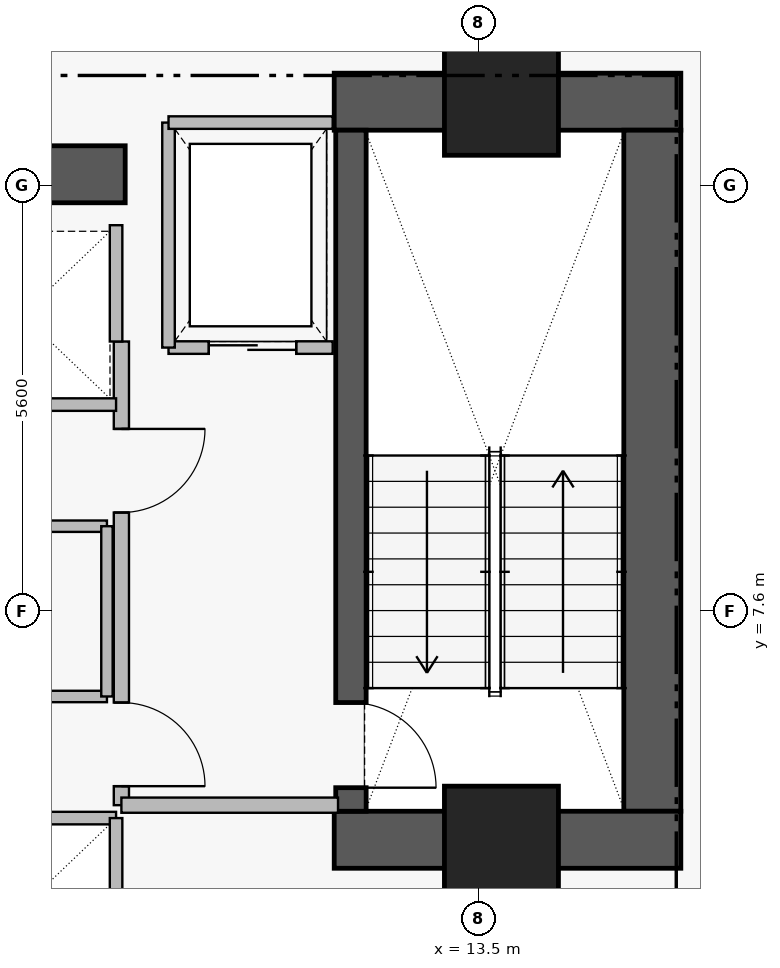
"""IFC4 building model, lengths in metres.
Left out: names, types, materials, properties, quantities, classifications, styles, units other than length and angle.
Written with IfcOpenShell. Run it as: python <this file> out.ifc"""

import sys

from ifc_helpers import new_model, si_unit, direction, frame, frame_2d, origin, origin_2d, place, context, subcontext, project, spatial, rectangle, extrude, element, fill, save


model = new_model("IFC4")
c1 = context("Model", 3, precision=1e-05, world=origin(), true_north=direction((0.0, 1.0)))
c2 = subcontext(c1, "Body", "Model", "MODEL_VIEW")
j1 = project(units=[si_unit("LENGTHUNIT", "METRE"), si_unit("PLANEANGLEUNIT", "RADIAN")], contexts=[c1])
p1 = place(None, origin())
s1 = spatial("IfcSite", under=j1, at=p1, CompositionType="ELEMENT")
p2 = place(p1, origin())
s2 = spatial("IfcBuilding", under=s1, at=p2, CompositionType="ELEMENT")
p3 = place(p2, frame((0.0, 0.0, 106.6)))
s3 = spatial("IfcBuildingStorey", under=s2, at=p3, CompositionType="ELEMENT", Elevation=106.6)
p4 = place(p3, frame((11.6, 14.305, 0.0), z_axis=(0.0, 0.0, 1.0), x_axis=(1.0, 0.0, 0.0)))
e1 = element("IfcWall", 1, at=p4, inside=s3, PredefinedType="SHEAR", context=c2, shape_type="SweptSolid", body=[
    extrude(rectangle(XDim=4.56, YDim=0.75, at=frame_2d((2.28, 0.0))), origin(), (0.0, 0.0, 1.0), 3.46),
])
p5 = place(p3, frame((15.785, 4.97, 0.0), z_axis=(0.0, 0.0, 1.0), x_axis=(0.0, 1.0, 0.0)))
e2 = element("IfcWall", 2, at=p5, inside=s3, PredefinedType="SHEAR", context=c2, shape_type="SweptSolid", body=[
    extrude(rectangle(XDim=8.96, YDim=0.75, at=frame_2d((4.48, 0.0))), origin(), (0.0, 0.0, 1.0), 3.46),
])
p6 = place(p3, frame((11.6, 4.595, 0.0), z_axis=(0.0, 0.0, 1.0), x_axis=(1.0, 0.0, 0.0)))
e3 = element("IfcWall", 3, at=p6, inside=s3, PredefinedType="SHEAR", context=c2, shape_type="SweptSolid", body=[
    extrude(rectangle(XDim=4.56, YDim=0.75, at=frame_2d((2.28, 0.0))), origin(), (0.0, 0.0, 1.0), 3.46),
])
p7 = place(p3, frame((1.25, 13.35, 0.0), z_axis=(0.0, 0.0, 1.0), x_axis=(1.0, 0.0, 0.0)))
e4 = element("IfcWall", 4, at=p7, inside=s3, PredefinedType="SHEAR", context=c2, shape_type="SweptSolid", body=[
    extrude(rectangle(XDim=7.6, YDim=0.75, at=frame_2d((3.8, 0.0))), origin(), (0.0, 0.0, 1.0), 3.43),
])
p8 = place(p3, frame((11.82, 13.93, 0.0), z_axis=(0.0, 0.0, 1.0), x_axis=(0.0, -1.0, 0.0)))
e5 = element("IfcWall", 5, at=p8, inside=s3, PredefinedType="SHEAR", context=c2, shape_type="SweptSolid", body=[
    extrude(rectangle(XDim=8.96, YDim=0.4, at=frame_2d((4.48, 0.0))), origin(), (0.0, 0.0, 1.0), 3.46),
])
p9 = place(p8, frame((7.53, 0.0, 0.0)))
e6 = element("IfcOpeningElement", 6, at=p9, cuts=e5, PredefinedType="OPENING", context=c2, shape_type="SweptSolid", body=[
    extrude(rectangle(XDim=1.12, YDim=2.22, at=frame_2d((0.56, 1.11))), frame((0.0, 0.21, 0.0), z_axis=(0.0, -1.0, 0.0), x_axis=(1.0, 0.0, 0.0)), (0.0, 0.0, 1.0), 0.42),
])
for number, where, z_axis, x_axis in (
    (7, (13.8, 14.35, 0.0), (0.0, 0.0, 1.0), (1.0, 0.0, 0.0)),
    (8, (13.8, 4.55, 0.0), (0.0, 0.0, 1.0), (1.0, 0.0, 0.0)),
):
    element("IfcColumn", number, at=place(p3, frame(where, z_axis=z_axis, x_axis=x_axis)), inside=s3, PredefinedType="COLUMN", context=c2, shape_type="SweptSolid", body=[
        extrude(rectangle(XDim=1.5, YDim=1.5, at=origin_2d()), origin(), (0.0, 0.0, 1.0), 3.65),
    ])
p10 = place(p3, frame((8.8, 11.15, 0.0), z_axis=(0.0, 0.0, 1.0), x_axis=(0.0, -1.0, 0.0)))
e9 = element("IfcWall", 9, at=p10, inside=s3, PredefinedType="PARTITIONING", context=c2, shape_type="SweptSolid", body=[
    extrude(rectangle(XDim=6.1, YDim=0.2, at=frame_2d((3.05, 0.0))), origin(), (0.0, 0.0, 1.0), 3.43),
])
p11 = place(p10, frame((1.15, 0.0, 0.0)))
e10 = element("IfcOpeningElement", 10, at=p11, cuts=e9, PredefinedType="OPENING", context=c2, shape_type="SweptSolid", body=[
    extrude(rectangle(XDim=1.1, YDim=2.2, at=frame_2d((0.55, 1.1))), frame((0.0, 0.11, 0.0), z_axis=(0.0, -1.0, 0.0), x_axis=(1.0, 0.0, 0.0)), (0.0, 0.0, 1.0), 0.22),
])
p12 = place(p10, frame((4.75, 0.0, 0.0)))
e11 = element("IfcOpeningElement", 11, at=p12, cuts=e9, PredefinedType="OPENING", context=c2, shape_type="SweptSolid", body=[
    extrude(rectangle(XDim=1.1, YDim=2.2, at=frame_2d((0.55, 1.1))), frame((0.0, 0.11, 0.0), z_axis=(0.0, -1.0, 0.0), x_axis=(1.0, 0.0, 0.0)), (0.0, 0.0, 1.0), 0.22),
])
p13 = place(p3, frame((9.42, 11.07, 0.0), z_axis=(0.0, 0.0, 1.0), x_axis=(1.0, 0.0, 0.0)))
e12 = element("IfcWall", 12, at=p13, inside=s3, PredefinedType="PARTITIONING", context=c2, shape_type="SweptSolid", body=[
    extrude(rectangle(XDim=2.16, YDim=0.165, at=frame_2d((1.08, 0.0))), origin(), (0.0, 0.0, 1.0), 3.43),
])
p14 = place(p13, frame((0.53, 0.0, 0.0)))
e13 = element("IfcOpeningElement", 13, at=p14, cuts=e12, PredefinedType="OPENING", context=c2, shape_type="SweptSolid", body=[
    extrude(rectangle(XDim=1.15, YDim=2.25, at=frame_2d((0.575, 1.125))), frame((0.0, 0.093, 0.0), z_axis=(0.0, -1.0, 0.0), x_axis=(1.0, 0.0, 0.0)), (0.0, 0.0, 1.0), 0.185),
])
p15 = place(p3, frame((4.37, 6.48, 0.0), z_axis=(0.0, 0.0, 1.0), x_axis=(1.0, 0.0, 0.0)))
e14 = element("IfcWall", 14, at=p15, inside=s3, PredefinedType="PARTITIONING", context=c2, shape_type="SweptSolid", body=[
    extrude(rectangle(XDim=4.24, YDim=0.15, at=frame_2d((2.12, 0.0))), origin(), (0.0, 0.0, 1.0), 3.43),
])
p16 = place(p15, frame((1.67, 0.0, 0.0)))
e15 = element("IfcOpeningElement", 15, at=p16, cuts=e14, PredefinedType="OPENING", context=c2, shape_type="SweptSolid", body=[
    extrude(rectangle(XDim=0.9, YDim=2.15, at=frame_2d((0.45, 1.075))), frame((0.0, 0.085, 0.0), z_axis=(0.0, -1.0, 0.0), x_axis=(1.0, 0.0, 0.0)), (0.0, 0.0, 1.0), 0.17),
])
p17 = place(p3, frame((8.8, 5.05, 0.0), z_axis=(0.0, 0.0, 1.0), x_axis=(1.0, 0.0, 0.0)))
e16 = element("IfcWall", 16, at=p17, inside=s3, PredefinedType="PARTITIONING", context=c2, shape_type="SweptSolid", body=[
    extrude(rectangle(XDim=2.85, YDim=0.2, at=frame_2d((1.425, 0.0))), origin(), (0.0, 0.0, 1.0), 3.43),
])
p18 = place(p3, frame((9.42, 11.07, 0.0), z_axis=(0.0, 0.0, 1.0), x_axis=(0.0, 1.0, 0.0)))
e17 = element("IfcWall", 17, at=p18, inside=s3, PredefinedType="PARTITIONING", context=c2, shape_type="SweptSolid", body=[
    extrude(rectangle(XDim=2.96, YDim=0.165, at=frame_2d((1.48, 0.0))), origin(), (0.0, 0.0, 1.0), 3.43),
])
p19 = place(p3, frame((9.42, 14.03, 0.0), z_axis=(0.0, 0.0, 1.0), x_axis=(1.0, 0.0, 0.0)))
e18 = element("IfcWall", 18, at=p19, inside=s3, PredefinedType="PARTITIONING", context=c2, shape_type="SweptSolid", body=[
    extrude(rectangle(XDim=2.16, YDim=0.165, at=frame_2d((1.08, 0.0))), origin(), (0.0, 0.0, 1.0), 3.43),
])
p20 = place(p3, frame((6.25, 4.88, 0.0), z_axis=(0.0, 0.0, 1.0), x_axis=(1.0, 0.0, 0.0)))
e19 = element("IfcWall", 19, at=p20, inside=s3, PredefinedType="PARTITIONING", context=c2, shape_type="SweptSolid", body=[
    extrude(rectangle(XDim=2.48, YDim=0.165, at=frame_2d((1.24, 0.0))), origin(), (0.0, 0.0, 1.0), 3.43),
])
p21 = place(p3, frame((8.73, 2.52, 0.0), z_axis=(0.0, 0.0, 1.0), x_axis=(0.0, 1.0, 0.0)))
e20 = element("IfcWall", 20, at=p21, inside=s3, PredefinedType="PARTITIONING", context=c2, shape_type="SweptSolid", body=[
    extrude(rectangle(XDim=2.36, YDim=0.165, at=frame_2d((1.18, 0.0))), origin(), (0.0, 0.0, 1.0), 3.43),
])
p22 = place(p3, frame((6.25, 10.32, 0.0), z_axis=(0.0, 0.0, 1.0), x_axis=(1.0, 0.0, 0.0)))
e21 = element("IfcWall", 21, at=p22, inside=s3, PredefinedType="PARTITIONING", context=c2, shape_type="SweptSolid", body=[
    extrude(rectangle(XDim=2.48, YDim=0.165, at=frame_2d((1.24, 0.0))), origin(), (0.0, 0.0, 1.0), 3.43),
])
p23 = place(p3, frame((8.73, 11.15, 0.0), z_axis=(0.0, 0.0, 1.0), x_axis=(0.0, 1.0, 0.0)))
e22 = element("IfcWall", 22, at=p23, inside=s3, PredefinedType="PARTITIONING", context=c2, shape_type="SweptSolid", body=[
    extrude(rectangle(XDim=1.53, YDim=0.165, at=frame_2d((0.765, 0.0))), origin(), (0.0, 0.0, 1.0), 3.43),
])
p24 = place(p3, frame((4.37, 8.72, 0.0), z_axis=(0.0, 0.0, 1.0), x_axis=(1.0, 0.0, 0.0)))
e23 = element("IfcWall", 23, at=p24, inside=s3, PredefinedType="PARTITIONING", context=c2, shape_type="SweptSolid", body=[
    extrude(rectangle(XDim=4.24, YDim=0.15, at=frame_2d((2.12, 0.0))), origin(), (0.0, 0.0, 1.0), 3.43),
])
p25 = place(p3, frame((8.61, 6.48, 0.0), z_axis=(0.0, 0.0, 1.0), x_axis=(0.0, 1.0, 0.0)))
e24 = element("IfcWall", 24, at=p25, inside=s3, PredefinedType="PARTITIONING", context=c2, shape_type="SweptSolid", body=[
    extrude(rectangle(XDim=2.24, YDim=0.15, at=frame_2d((1.12, 0.0))), origin(), (0.0, 0.0, 1.0), 3.43),
])
p26 = place(p9, origin())
e25 = element("IfcDoor", 25, at=p26, inside=s3, OperationType="SINGLE_SWING_RIGHT", PredefinedType="DOOR", context=c2, shape_type="SweptSolid", body=[
    extrude(rectangle(XDim=1.12, YDim=2.22, at=frame_2d((0.56, 1.11))), frame((0.0, 0.025, 0.0), z_axis=(0.0, -1.0, 0.0), x_axis=(1.0, 0.0, 0.0)), (0.0, 0.0, 1.0), 0.05),
])
fill(e6, e25)
p27 = place(p11, origin())
e26 = element("IfcDoor", 26, at=p27, inside=s3, OperationType="SINGLE_SWING_LEFT", PredefinedType="DOOR", context=c2, shape_type="SweptSolid", body=[
    extrude(rectangle(XDim=1.1, YDim=2.2, at=frame_2d((0.55, 1.1))), frame((0.0, 0.025, 0.0), z_axis=(0.0, -1.0, 0.0), x_axis=(1.0, 0.0, 0.0)), (0.0, 0.0, 1.0), 0.05),
])
fill(e10, e26)
p28 = place(p12, origin())
e27 = element("IfcDoor", 27, at=p28, inside=s3, OperationType="SINGLE_SWING_RIGHT", PredefinedType="DOOR", context=c2, shape_type="SweptSolid", body=[
    extrude(rectangle(XDim=1.1, YDim=2.2, at=frame_2d((0.55, 1.1))), frame((0.0, 0.025, 0.0), z_axis=(0.0, -1.0, 0.0), x_axis=(1.0, 0.0, 0.0)), (0.0, 0.0, 1.0), 0.05),
])
fill(e11, e27)
p29 = place(p14, origin())
e28 = element("IfcDoor", 28, at=p29, inside=s3, OperationType="SLIDING_TO_LEFT", PredefinedType="DOOR", context=c2, shape_type="SweptSolid", body=[
    extrude(rectangle(XDim=1.15, YDim=2.25, at=frame_2d((0.575, 1.125))), frame((0.0, 0.025, 0.0), z_axis=(0.0, -1.0, 0.0), x_axis=(1.0, 0.0, 0.0)), (0.0, 0.0, 1.0), 0.05),
])
fill(e13, e28)
save(model, sys.argv[1])
